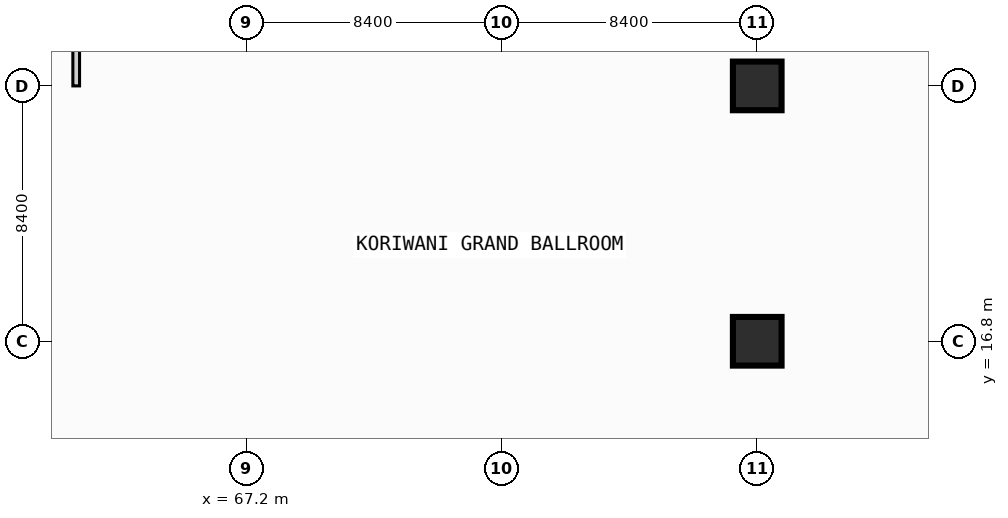
"""IFC4 building model, lengths in metres.
Left out: names, types, materials, properties, quantities, classifications, styles, units other than length and angle.
Written with IfcOpenShell. Run it as: python <this file> out.ifc"""

import sys

from ifc_helpers import new_model, si_unit, direction, frame, frame_2d, origin, origin_2d, place, context, subcontext, project, spatial, rectangle, extrude, element, save


model = new_model("IFC4")
c1 = context("Model", 3, precision=1e-05, world=origin(), true_north=direction((0.0, 1.0)))
c2 = subcontext(c1, "Body", "Model", "MODEL_VIEW")
j1 = project(units=[si_unit("LENGTHUNIT", "METRE"), si_unit("PLANEANGLEUNIT", "RADIAN")], contexts=[c1])
p1 = place(None, origin())
s1 = spatial("IfcSite", under=j1, at=p1, CompositionType="ELEMENT")
p2 = place(p1, origin())
s2 = spatial("IfcBuilding", under=s1, at=p2, CompositionType="ELEMENT")
p3 = place(p2, frame((0.0, 0.0, 15.6)))
s3 = spatial("IfcBuildingStorey", under=s2, at=p3, CompositionType="ELEMENT", Elevation=15.6)
for number, where, z_axis, x_axis in (
    (1, (84.0, 16.8, 0.0), (0.0, 0.0, 1.0), (1.0, 0.0, 0.0)),
    (2, (84.0, 25.2, 0.0), (0.0, 0.0, 1.0), (1.0, 0.0, 0.0)),
):
    element("IfcColumn", number, at=place(p3, frame(where, z_axis=z_axis, x_axis=x_axis)), inside=s3, PredefinedType="COLUMN", context=c2, shape_type="SweptSolid", body=[
        extrude(rectangle(XDim=1.6, YDim=1.6, at=origin_2d()), origin(), (0.0, 0.0, 1.0), 5.2),
    ])
p4 = place(p3, frame((61.6, 25.2, 0.0), z_axis=(0.0, 0.0, 1.0), x_axis=(0.0, 1.0, 0.0)))
e3 = element("IfcWall", 3, at=p4, inside=s3, PredefinedType="PARTITIONING", context=c2, shape_type="SweptSolid", body=[
    extrude(rectangle(XDim=8.4, YDim=0.22, at=frame_2d((4.2, 0.0))), origin(), (0.0, 0.0, 1.0), 4.85),
])
p5 = place(p4, frame((3.0, 0.0, 0.0)))
e4 = element("IfcOpeningElement", 4, at=p5, cuts=e3, PredefinedType="OPENING", context=c2, shape_type="SweptSolid", body=[
    extrude(rectangle(XDim=2.0, YDim=2.15, at=frame_2d((1.0, 1.075))), frame((0.0, 0.12, 0.0), z_axis=(0.0, -1.0, 0.0), x_axis=(1.0, 0.0, 0.0)), (0.0, 0.0, 1.0), 0.24),
])
save(model, sys.argv[1])
